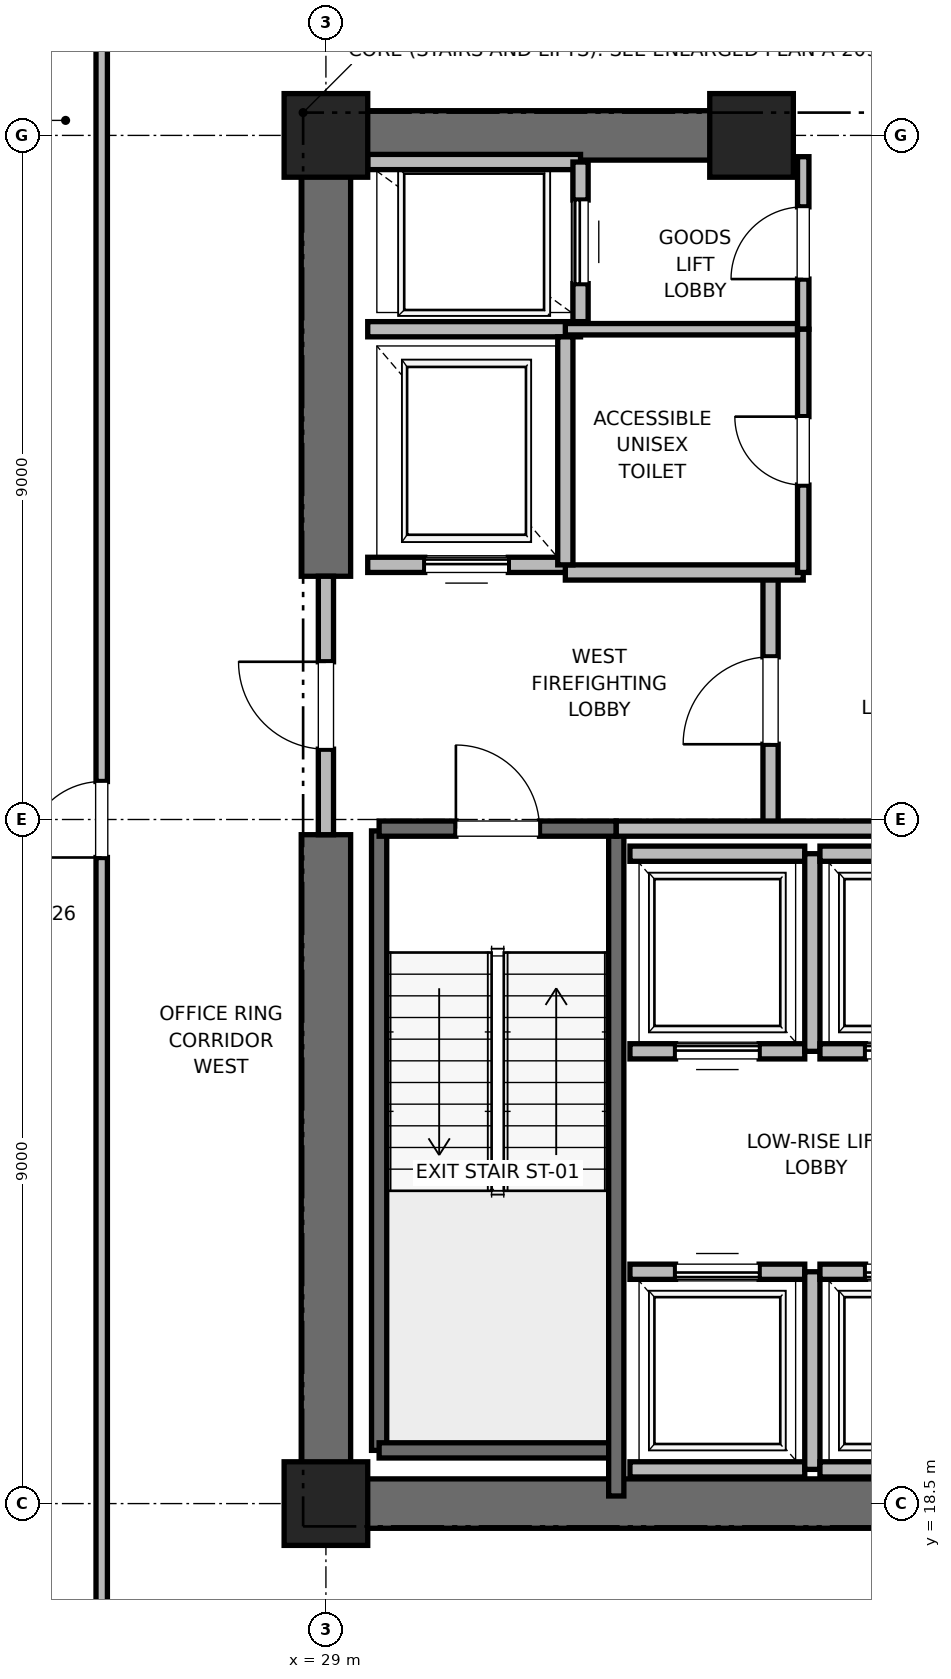
"""IFC4 building model, lengths in metres.
Left out: names, types, materials, properties, quantities, classifications, styles, units other than length and angle.
Written with IfcOpenShell. Run it as: python <this file> out.ifc"""

import sys

from ifc_helpers import new_model, si_unit, direction, frame, frame_2d, origin, origin_2d, place, context, subcontext, project, spatial, rectangle, extrude, element, fill, save


model = new_model("IFC4")
c1 = context("Model", 3, precision=1e-05, world=origin(), true_north=direction((0.0, 1.0)))
c2 = subcontext(c1, "Body", "Model", "MODEL_VIEW")
j1 = project(units=[si_unit("LENGTHUNIT", "METRE"), si_unit("PLANEANGLEUNIT", "RADIAN")], contexts=[c1])
p1 = place(None, origin())
s1 = spatial("IfcSite", under=j1, at=p1, CompositionType="ELEMENT")
p2 = place(p1, origin())
s2 = spatial("IfcBuilding", under=s1, at=p2, CompositionType="ELEMENT")
p3 = place(p2, frame((0.0, 0.0, 31.6)))
s3 = spatial("IfcBuildingStorey", under=s2, at=p3, CompositionType="ELEMENT", Elevation=31.6)
for number, where, z_axis, x_axis in (
    (1, (29.0, 18.5, 0.0), (0.0, 0.0, 1.0), (1.0, 0.0, 0.0)),
    (2, (29.0, 36.5, 0.0), (0.0, 0.0, 1.0), (1.0, 0.0, 0.0)),
    (3, (34.6, 36.5, 0.0), (0.0, 0.0, 1.0), (1.0, 0.0, 0.0)),
):
    element("IfcColumn", number, at=place(p3, frame(where, z_axis=z_axis, x_axis=x_axis)), inside=s3, PredefinedType="PILASTER", context=c2, shape_type="SweptSolid", body=[
        extrude(rectangle(XDim=1.1, YDim=1.1, at=origin_2d()), origin(), (0.0, 0.0, 1.0), 4.0),
    ])
p4 = place(p3, frame((29.0, 18.5, 0.0), z_axis=(0.0, 0.0, 1.0), x_axis=(1.0, 0.0, 0.0)))
e4 = element("IfcWall", 4, at=p4, inside=s3, PredefinedType="SHEAR", context=c2, shape_type="SweptSolid", body=[
    extrude(rectangle(XDim=9.2, YDim=0.65, at=frame_2d((4.6, 0.0))), origin(), (0.0, 0.0, 1.0), 3.76),
])
p5 = place(p3, frame((29.0, 36.5, 0.0), z_axis=(0.0, 0.0, 1.0), x_axis=(1.0, 0.0, 0.0)))
e5 = element("IfcWall", 5, at=p5, inside=s3, PredefinedType="SHEAR", context=c2, shape_type="SweptSolid", body=[
    extrude(rectangle(XDim=5.8, YDim=0.65, at=frame_2d((2.9, 0.0))), origin(), (0.0, 0.0, 1.0), 3.76),
])
p6 = place(p3, frame((29.0, 18.5, 0.0), z_axis=(0.0, 0.0, 1.0), x_axis=(0.0, 1.0, 0.0)))
e6 = element("IfcWall", 6, at=p6, inside=s3, PredefinedType="SHEAR", context=c2, shape_type="SweptSolid", body=[
    extrude(rectangle(XDim=8.8, YDim=0.65, at=frame_2d((4.4, 0.0))), origin(), (0.0, 0.0, 1.0), 3.76),
])
p7 = place(p3, frame((29.0, 30.7, 0.0), z_axis=(0.0, 0.0, 1.0), x_axis=(0.0, 1.0, 0.0)))
e7 = element("IfcWall", 7, at=p7, inside=s3, PredefinedType="SHEAR", context=c2, shape_type="SweptSolid", body=[
    extrude(rectangle(XDim=5.8, YDim=0.65, at=frame_2d((2.9, 0.0))), origin(), (0.0, 0.0, 1.0), 3.76),
])
p8 = place(p3, frame((29.7, 19.2, 0.0), z_axis=(0.0, 0.0, 1.0), x_axis=(0.0, 1.0, 0.0)))
e8 = element("IfcWall", 8, at=p8, inside=s3, PredefinedType="SOLIDWALL", context=c2, shape_type="SweptSolid", body=[
    extrude(rectangle(XDim=8.15, YDim=0.2, at=frame_2d((4.075, 0.0))), origin(), (0.0, 0.0, 1.0), 3.76),
])
p9 = place(p3, frame((29.7, 19.2, 0.0), z_axis=(0.0, 0.0, 1.0), x_axis=(1.0, 0.0, 0.0)))
e9 = element("IfcWall", 9, at=p9, inside=s3, PredefinedType="SOLIDWALL", context=c2, shape_type="SweptSolid", body=[
    extrude(rectangle(XDim=3.12, YDim=0.2, at=frame_2d((1.56, 0.0))), origin(), (0.0, 0.0, 1.0), 3.76),
])
p10 = place(p3, frame((32.82, 18.6, 0.0), z_axis=(0.0, 0.0, 1.0), x_axis=(0.0, 1.0, 0.0)))
e10 = element("IfcWall", 10, at=p10, inside=s3, PredefinedType="SOLIDWALL", context=c2, shape_type="SweptSolid", body=[
    extrude(rectangle(XDim=8.78, YDim=0.2, at=frame_2d((4.39, 0.0))), origin(), (0.0, 0.0, 1.0), 3.76),
])
p11 = place(p3, frame((29.7, 27.38, 0.0), z_axis=(0.0, 0.0, 1.0), x_axis=(1.0, 0.0, 0.0)))
e11 = element("IfcWall", 11, at=p11, inside=s3, PredefinedType="SOLIDWALL", context=c2, shape_type="SweptSolid", body=[
    extrude(rectangle(XDim=3.12, YDim=0.2, at=frame_2d((1.56, 0.0))), origin(), (0.0, 0.0, 1.0), 3.76),
])
p12 = place(p11, frame((1.01, 0.0, 0.0)))
e12 = element("IfcOpeningElement", 12, at=p12, cuts=e11, PredefinedType="OPENING", context=c2, shape_type="SweptSolid", body=[
    extrude(rectangle(XDim=1.1, YDim=2.15, at=frame_2d((0.55, 1.075))), frame((0.0, 0.1, 0.0), z_axis=(0.0, -1.0, 0.0), x_axis=(1.0, 0.0, 0.0)), (0.0, 0.0, 1.0), 0.2),
])
p13 = place(p3, frame((34.85, 27.38, 0.0), z_axis=(0.0, 0.0, 1.0), x_axis=(0.0, 1.0, 0.0)))
e13 = element("IfcWall", 13, at=p13, inside=s3, PredefinedType="PARTITIONING", context=c2, shape_type="SweptSolid", body=[
    extrude(rectangle(XDim=3.37, YDim=0.2, at=frame_2d((1.685, 0.0))), origin(), (0.0, 0.0, 1.0), 3.76),
])
p14 = place(p13, frame((1.11, 0.0, 0.0)))
e14 = element("IfcOpeningElement", 14, at=p14, cuts=e13, PredefinedType="OPENING", context=c2, shape_type="SweptSolid", body=[
    extrude(rectangle(XDim=1.15, YDim=2.2, at=frame_2d((0.575, 1.1))), frame((0.0, 0.1, 0.0), z_axis=(0.0, -1.0, 0.0), x_axis=(1.0, 0.0, 0.0)), (0.0, 0.0, 1.0), 0.2),
])
p15 = place(p3, frame((29.0, 27.3, 0.0), z_axis=(0.0, 0.0, 1.0), x_axis=(0.0, 1.0, 0.0)))
e15 = element("IfcWall", 15, at=p15, inside=s3, PredefinedType="PARTITIONING", context=c2, shape_type="SweptSolid", body=[
    extrude(rectangle(XDim=3.4, YDim=0.2, at=frame_2d((1.7, 0.0))), origin(), (0.0, 0.0, 1.0), 2.54),
])
p16 = place(p15, frame((1.125, 0.0, 0.0)))
e16 = element("IfcOpeningElement", 16, at=p16, cuts=e15, PredefinedType="OPENING", context=c2, shape_type="SweptSolid", body=[
    extrude(rectangle(XDim=1.15, YDim=2.2, at=frame_2d((0.575, 1.1))), frame((0.0, 0.1, 0.0), z_axis=(0.0, -1.0, 0.0), x_axis=(1.0, 0.0, 0.0)), (0.0, 0.0, 1.0), 0.2),
])
p17 = place(p3, frame((32.82, 27.38, 0.0), z_axis=(0.0, 0.0, 1.0), x_axis=(1.0, 0.0, 0.0)))
e17 = element("IfcWall", 17, at=p17, inside=s3, PredefinedType="PARTITIONING", context=c2, shape_type="SweptSolid", body=[
    extrude(rectangle(XDim=5.62, YDim=0.2, at=frame_2d((2.81, 0.0))), origin(), (0.0, 0.0, 1.0), 3.76),
])
p18 = place(p3, frame((32.15, 30.75, 0.0), z_axis=(0.0, 0.0, 1.0), x_axis=(1.0, 0.0, 0.0)))
e18 = element("IfcWall", 18, at=p18, inside=s3, PredefinedType="PARTITIONING", context=c2, shape_type="SweptSolid", body=[
    extrude(rectangle(XDim=3.13, YDim=0.2, at=frame_2d((1.565, 0.0))), origin(), (0.0, 0.0, 1.0), 3.76),
])
p19 = place(p3, frame((29.55, 30.85, 0.0), z_axis=(0.0, 0.0, 1.0), x_axis=(1.0, 0.0, 0.0)))
e19 = element("IfcWall", 19, at=p19, inside=s3, PredefinedType="SOLIDWALL", context=c2, shape_type="SweptSolid", body=[
    extrude(rectangle(XDim=2.6, YDim=0.2, at=frame_2d((1.3, 0.0))), origin(), (0.0, 0.0, 1.0), 2.54),
])
p20 = place(p19, frame((0.75, 0.0, 0.0)))
e20 = element("IfcOpeningElement", 20, at=p20, cuts=e19, PredefinedType="OPENING", context=c2, shape_type="SweptSolid", body=[
    extrude(rectangle(XDim=1.1, YDim=2.2, at=frame_2d((0.55, 1.1))), frame((0.0, 0.1, 0.0), z_axis=(0.0, -1.0, 0.0), x_axis=(1.0, 0.0, 0.0)), (0.0, 0.0, 1.0), 0.2),
])
p21 = place(p3, frame((29.55, 33.95, 0.0), z_axis=(0.0, 0.0, 1.0), x_axis=(1.0, 0.0, 0.0)))
e21 = element("IfcWall", 21, at=p21, inside=s3, PredefinedType="SOLIDWALL", context=c2, shape_type="SweptSolid", body=[
    extrude(rectangle(XDim=2.8, YDim=0.2, at=frame_2d((1.4, 0.0))), origin(), (0.0, 0.0, 1.0), 3.76),
])
p22 = place(p3, frame((32.15, 30.85, 0.0), z_axis=(0.0, 0.0, 1.0), x_axis=(0.0, 1.0, 0.0)))
e22 = element("IfcWall", 22, at=p22, inside=s3, PredefinedType="SOLIDWALL", context=c2, shape_type="SweptSolid", body=[
    extrude(rectangle(XDim=3.0, YDim=0.2, at=frame_2d((1.5, 0.0))), origin(), (0.0, 0.0, 1.0), 3.76),
])
p23 = place(p3, frame((32.35, 36.15, 0.0), z_axis=(0.0, 0.0, 1.0), x_axis=(-1.0, 0.0, 0.0)))
e23 = element("IfcWall", 23, at=p23, inside=s3, PredefinedType="SOLIDWALL", context=c2, shape_type="SweptSolid", body=[
    extrude(rectangle(XDim=2.8, YDim=0.2, at=frame_2d((1.4, 0.0))), origin(), (0.0, 0.0, 1.0), 2.889),
])
p24 = place(p3, frame((32.35, 34.05, 0.0), z_axis=(0.0, 0.0, 1.0), x_axis=(0.0, 1.0, 0.0)))
e24 = element("IfcWall", 24, at=p24, inside=s3, PredefinedType="SOLIDWALL", context=c2, shape_type="SweptSolid", body=[
    extrude(rectangle(XDim=2.1, YDim=0.2, at=frame_2d((1.05, 0.0))), origin(), (0.0, 0.0, 1.0), 3.76),
])
p25 = place(p24, frame((0.5, 0.0, 0.0)))
e25 = element("IfcOpeningElement", 25, at=p25, cuts=e24, PredefinedType="OPENING", context=c2, shape_type="SweptSolid", body=[
    extrude(rectangle(XDim=1.1, YDim=2.2, at=frame_2d((0.55, 1.1))), frame((0.0, 0.1, 0.0), z_axis=(0.0, -1.0, 0.0), x_axis=(1.0, 0.0, 0.0)), (0.0, 0.0, 1.0), 0.2),
])
p26 = place(p3, frame((33.0, 18.95, 0.0), z_axis=(0.0, 0.0, 1.0), x_axis=(1.0, 0.0, 0.0)))
e26 = element("IfcWall", 26, at=p26, inside=s3, PredefinedType="SOLIDWALL", context=c2, shape_type="SweptSolid", body=[
    extrude(rectangle(XDim=2.3, YDim=0.2, at=frame_2d((1.15, 0.0))), origin(), (0.0, 0.0, 1.0), 3.76),
])
p27 = place(p3, frame((35.3, 21.55, 0.0), z_axis=(0.0, 0.0, 1.0), x_axis=(-1.0, 0.0, 0.0)))
e27 = element("IfcWall", 27, at=p27, inside=s3, PredefinedType="SOLIDWALL", context=c2, shape_type="SweptSolid", body=[
    extrude(rectangle(XDim=2.3, YDim=0.2, at=frame_2d((1.15, 0.0))), origin(), (0.0, 0.0, 1.0), 3.76),
])
p28 = place(p27, frame((0.6, 0.0, 0.0)))
e28 = element("IfcOpeningElement", 28, at=p28, cuts=e27, PredefinedType="OPENING", context=c2, shape_type="SweptSolid", body=[
    extrude(rectangle(XDim=1.1, YDim=2.2, at=frame_2d((0.55, 1.1))), frame((0.0, 0.1, 0.0), z_axis=(0.0, -1.0, 0.0), x_axis=(1.0, 0.0, 0.0)), (0.0, 0.0, 1.0), 0.2),
])
p29 = place(p3, frame((35.4, 18.95, 0.0), z_axis=(0.0, 0.0, 1.0), x_axis=(0.0, 1.0, 0.0)))
e29 = element("IfcWall", 29, at=p29, inside=s3, PredefinedType="SOLIDWALL", context=c2, shape_type="SweptSolid", body=[
    extrude(rectangle(XDim=2.6, YDim=0.2, at=frame_2d((1.3, 0.0))), origin(), (0.0, 0.0, 1.0), 3.76),
])
p30 = place(p3, frame((35.5, 18.95, 0.0), z_axis=(0.0, 0.0, 1.0), x_axis=(1.0, 0.0, 0.0)))
e30 = element("IfcWall", 30, at=p30, inside=s3, PredefinedType="SOLIDWALL", context=c2, shape_type="SweptSolid", body=[
    extrude(rectangle(XDim=2.3, YDim=0.2, at=frame_2d((1.15, 0.0))), origin(), (0.0, 0.0, 1.0), 2.54),
])
p31 = place(p3, frame((37.8, 21.55, 0.0), z_axis=(0.0, 0.0, 1.0), x_axis=(-1.0, 0.0, 0.0)))
e31 = element("IfcWall", 31, at=p31, inside=s3, PredefinedType="SOLIDWALL", context=c2, shape_type="SweptSolid", body=[
    extrude(rectangle(XDim=2.3, YDim=0.2, at=frame_2d((1.15, 0.0))), origin(), (0.0, 0.0, 1.0), 3.76),
])
p32 = place(p31, frame((0.6, 0.0, 0.0)))
e32 = element("IfcOpeningElement", 32, at=p32, cuts=e31, PredefinedType="OPENING", context=c2, shape_type="SweptSolid", body=[
    extrude(rectangle(XDim=1.1, YDim=2.2, at=frame_2d((0.55, 1.1))), frame((0.0, 0.1, 0.0), z_axis=(0.0, -1.0, 0.0), x_axis=(1.0, 0.0, 0.0)), (0.0, 0.0, 1.0), 0.2),
])
p33 = place(p3, frame((33.0, 24.45, 0.0), z_axis=(0.0, 0.0, 1.0), x_axis=(1.0, 0.0, 0.0)))
e33 = element("IfcWall", 33, at=p33, inside=s3, PredefinedType="SOLIDWALL", context=c2, shape_type="SweptSolid", body=[
    extrude(rectangle(XDim=2.3, YDim=0.2, at=frame_2d((1.15, 0.0))), origin(), (0.0, 0.0, 1.0), 3.76),
])
p34 = place(p33, frame((0.6, 0.0, 0.0)))
e34 = element("IfcOpeningElement", 34, at=p34, cuts=e33, PredefinedType="OPENING", context=c2, shape_type="SweptSolid", body=[
    extrude(rectangle(XDim=1.1, YDim=2.2, at=frame_2d((0.55, 1.1))), frame((0.0, 0.1, 0.0), z_axis=(0.0, -1.0, 0.0), x_axis=(1.0, 0.0, 0.0)), (0.0, 0.0, 1.0), 0.2),
])
p35 = place(p3, frame((35.3, 27.05, 0.0), z_axis=(0.0, 0.0, 1.0), x_axis=(-1.0, 0.0, 0.0)))
e35 = element("IfcWall", 35, at=p35, inside=s3, PredefinedType="SOLIDWALL", context=c2, shape_type="SweptSolid", body=[
    extrude(rectangle(XDim=2.3, YDim=0.2, at=frame_2d((1.15, 0.0))), origin(), (0.0, 0.0, 1.0), 3.76),
])
p36 = place(p3, frame((35.4, 24.45, 0.0), z_axis=(0.0, 0.0, 1.0), x_axis=(0.0, 1.0, 0.0)))
e36 = element("IfcWall", 36, at=p36, inside=s3, PredefinedType="SOLIDWALL", context=c2, shape_type="SweptSolid", body=[
    extrude(rectangle(XDim=2.6, YDim=0.2, at=frame_2d((1.3, 0.0))), origin(), (0.0, 0.0, 1.0), 3.76),
])
p37 = place(p3, frame((35.5, 24.45, 0.0), z_axis=(0.0, 0.0, 1.0), x_axis=(1.0, 0.0, 0.0)))
e37 = element("IfcWall", 37, at=p37, inside=s3, PredefinedType="SOLIDWALL", context=c2, shape_type="SweptSolid", body=[
    extrude(rectangle(XDim=2.3, YDim=0.2, at=frame_2d((1.15, 0.0))), origin(), (0.0, 0.0, 1.0), 3.76),
])
p38 = place(p37, frame((0.6, 0.0, 0.0)))
e38 = element("IfcOpeningElement", 38, at=p38, cuts=e37, PredefinedType="OPENING", context=c2, shape_type="SweptSolid", body=[
    extrude(rectangle(XDim=1.1, YDim=2.2, at=frame_2d((0.55, 1.1))), frame((0.0, 0.1, 0.0), z_axis=(0.0, -1.0, 0.0), x_axis=(1.0, 0.0, 0.0)), (0.0, 0.0, 1.0), 0.2),
])
p39 = place(p3, frame((37.8, 27.05, 0.0), z_axis=(0.0, 0.0, 1.0), x_axis=(-1.0, 0.0, 0.0)))
e39 = element("IfcWall", 39, at=p39, inside=s3, PredefinedType="SOLIDWALL", context=c2, shape_type="SweptSolid", body=[
    extrude(rectangle(XDim=2.3, YDim=0.2, at=frame_2d((1.15, 0.0))), origin(), (0.0, 0.0, 1.0), 3.76),
])
p40 = place(p3, frame((32.15, 33.95, 0.0), z_axis=(0.0, 0.0, 1.0), x_axis=(1.0, 0.0, 0.0)))
e40 = element("IfcWall", 40, at=p40, inside=s3, PredefinedType="PARTITIONING", context=c2, shape_type="SweptSolid", body=[
    extrude(rectangle(XDim=3.13, YDim=0.15, at=frame_2d((1.565, 0.0))), origin(), (0.0, 0.0, 1.0), 2.85),
])
p41 = place(p3, frame((35.28, 33.95, 0.0), z_axis=(0.0, 0.0, 1.0), x_axis=(0.0, 1.0, 0.0)))
e41 = element("IfcWall", 41, at=p41, inside=s3, PredefinedType="PARTITIONING", context=c2, shape_type="SweptSolid", body=[
    extrude(rectangle(XDim=2.27, YDim=0.15, at=frame_2d((1.135, 0.0))), origin(), (0.0, 0.0, 1.0), 2.54),
])
p42 = place(p41, frame((0.66, 0.0, 0.0)))
e42 = element("IfcOpeningElement", 42, at=p42, cuts=e41, PredefinedType="OPENING", context=c2, shape_type="SweptSolid", body=[
    extrude(rectangle(XDim=0.95, YDim=2.15, at=frame_2d((0.475, 1.075))), frame((0.0, 0.075, 0.0), z_axis=(0.0, -1.0, 0.0), x_axis=(1.0, 0.0, 0.0)), (0.0, 0.0, 1.0), 0.15),
])
p43 = place(p3, frame((35.28, 30.75, 0.0), z_axis=(0.0, 0.0, 1.0), x_axis=(0.0, 1.0, 0.0)))
e43 = element("IfcWall", 43, at=p43, inside=s3, PredefinedType="PARTITIONING", context=c2, shape_type="SweptSolid", body=[
    extrude(rectangle(XDim=3.2, YDim=0.15, at=frame_2d((1.6, 0.0))), origin(), (0.0, 0.0, 1.0), 2.85),
])
p44 = place(p43, frame((1.15, 0.0, 0.0)))
e44 = element("IfcOpeningElement", 44, at=p44, cuts=e43, PredefinedType="OPENING", context=c2, shape_type="SweptSolid", body=[
    extrude(rectangle(XDim=0.9, YDim=2.1, at=frame_2d((0.45, 1.05))), frame((0.0, 0.075, 0.0), z_axis=(0.0, -1.0, 0.0), x_axis=(1.0, 0.0, 0.0)), (0.0, 0.0, 1.0), 0.15),
])
p45 = place(p3, frame((26.05, 9.605, 0.0), z_axis=(0.0, 0.0, 1.0), x_axis=(0.0, 1.0, 0.0)))
e45 = element("IfcWall", 45, at=p45, inside=s3, PredefinedType="PARTITIONING", context=c2, shape_type="SweptSolid", body=[
    extrude(rectangle(XDim=35.79, YDim=0.15, at=frame_2d((17.895, 0.0))), origin(), (0.0, 0.0, 1.0), 2.85),
])
p46 = place(p45, frame((17.395, 0.0, 0.0)))
e46 = element("IfcOpeningElement", 46, at=p46, cuts=e45, PredefinedType="OPENING", context=c2, shape_type="SweptSolid", body=[
    extrude(rectangle(XDim=1.0, YDim=2.15, at=frame_2d((0.5, 1.075))), frame((0.0, 0.075, 0.0), z_axis=(0.0, -1.0, 0.0), x_axis=(1.0, 0.0, 0.0)), (0.0, 0.0, 1.0), 0.15),
])
p47 = place(p12, origin())
e47 = element("IfcDoor", 47, at=p47, inside=s3, OperationType="SINGLE_SWING_LEFT", PredefinedType="DOOR", context=c2, shape_type="SweptSolid", body=[
    extrude(rectangle(XDim=1.1, YDim=2.15, at=frame_2d((0.55, 1.075))), frame((0.0, 0.025, 0.0), z_axis=(0.0, -1.0, 0.0), x_axis=(1.0, 0.0, 0.0)), (0.0, 0.0, 1.0), 0.05),
])
fill(e12, e47)
p48 = place(p14, origin())
e48 = element("IfcDoor", 48, at=p48, inside=s3, OperationType="SINGLE_SWING_LEFT", PredefinedType="DOOR", context=c2, shape_type="SweptSolid", body=[
    extrude(rectangle(XDim=1.15, YDim=2.2, at=frame_2d((0.575, 1.1))), frame((0.0, 0.025, 0.0), z_axis=(0.0, -1.0, 0.0), x_axis=(1.0, 0.0, 0.0)), (0.0, 0.0, 1.0), 0.05),
])
fill(e14, e48)
p49 = place(p16, origin())
e49 = element("IfcDoor", 49, at=p49, inside=s3, OperationType="SINGLE_SWING_RIGHT", PredefinedType="DOOR", context=c2, shape_type="SweptSolid", body=[
    extrude(rectangle(XDim=1.15, YDim=2.2, at=frame_2d((0.575, 1.1))), frame((0.0, 0.025, 0.0), z_axis=(0.0, -1.0, 0.0), x_axis=(1.0, 0.0, 0.0)), (0.0, 0.0, 1.0), 0.05),
])
fill(e16, e49)
p50 = place(p20, origin())
e50 = element("IfcDoor", 50, at=p50, inside=s3, OperationType="SLIDING_TO_RIGHT", PredefinedType="DOOR", context=c2, shape_type="SweptSolid", body=[
    extrude(rectangle(XDim=1.1, YDim=2.2, at=frame_2d((0.55, 1.1))), frame((0.0, 0.025, 0.0), z_axis=(0.0, -1.0, 0.0), x_axis=(1.0, 0.0, 0.0)), (0.0, 0.0, 1.0), 0.05),
])
fill(e20, e50)
p51 = place(p25, origin())
e51 = element("IfcDoor", 51, at=p51, inside=s3, OperationType="SLIDING_TO_RIGHT", PredefinedType="DOOR", context=c2, shape_type="SweptSolid", body=[
    extrude(rectangle(XDim=1.1, YDim=2.2, at=frame_2d((0.55, 1.1))), frame((0.0, 0.025, 0.0), z_axis=(0.0, -1.0, 0.0), x_axis=(1.0, 0.0, 0.0)), (0.0, 0.0, 1.0), 0.05),
])
fill(e25, e51)
p52 = place(p28, origin())
e52 = element("IfcDoor", 52, at=p52, inside=s3, OperationType="SLIDING_TO_RIGHT", PredefinedType="DOOR", context=c2, shape_type="SweptSolid", body=[
    extrude(rectangle(XDim=1.1, YDim=2.2, at=frame_2d((0.55, 1.1))), frame((0.0, 0.025, 0.0), z_axis=(0.0, -1.0, 0.0), x_axis=(1.0, 0.0, 0.0)), (0.0, 0.0, 1.0), 0.05),
])
fill(e28, e52)
p53 = place(p32, origin())
e53 = element("IfcDoor", 53, at=p53, inside=s3, OperationType="SLIDING_TO_RIGHT", PredefinedType="DOOR", context=c2, shape_type="SweptSolid", body=[
    extrude(rectangle(XDim=1.1, YDim=2.2, at=frame_2d((0.55, 1.1))), frame((0.0, 0.025, 0.0), z_axis=(0.0, -1.0, 0.0), x_axis=(1.0, 0.0, 0.0)), (0.0, 0.0, 1.0), 0.05),
])
fill(e32, e53)
p54 = place(p34, origin())
e54 = element("IfcDoor", 54, at=p54, inside=s3, OperationType="SLIDING_TO_RIGHT", PredefinedType="DOOR", context=c2, shape_type="SweptSolid", body=[
    extrude(rectangle(XDim=1.1, YDim=2.2, at=frame_2d((0.55, 1.1))), frame((0.0, 0.025, 0.0), z_axis=(0.0, -1.0, 0.0), x_axis=(1.0, 0.0, 0.0)), (0.0, 0.0, 1.0), 0.05),
])
fill(e34, e54)
p55 = place(p38, origin())
e55 = element("IfcDoor", 55, at=p55, inside=s3, OperationType="SLIDING_TO_RIGHT", PredefinedType="DOOR", context=c2, shape_type="SweptSolid", body=[
    extrude(rectangle(XDim=1.1, YDim=2.2, at=frame_2d((0.55, 1.1))), frame((0.0, 0.025, 0.0), z_axis=(0.0, -1.0, 0.0), x_axis=(1.0, 0.0, 0.0)), (0.0, 0.0, 1.0), 0.05),
])
fill(e38, e55)
p56 = place(p42, origin())
e56 = element("IfcDoor", 56, at=p56, inside=s3, OperationType="SINGLE_SWING_LEFT", PredefinedType="DOOR", context=c2, shape_type="SweptSolid", body=[
    extrude(rectangle(XDim=0.95, YDim=2.15, at=frame_2d((0.475, 1.075))), frame((0.0, 0.025, 0.0), z_axis=(0.0, -1.0, 0.0), x_axis=(1.0, 0.0, 0.0)), (0.0, 0.0, 1.0), 0.05),
])
fill(e42, e56)
p57 = place(p44, origin())
e57 = element("IfcDoor", 57, at=p57, inside=s3, OperationType="SINGLE_SWING_RIGHT", PredefinedType="DOOR", context=c2, shape_type="SweptSolid", body=[
    extrude(rectangle(XDim=0.9, YDim=2.1, at=frame_2d((0.45, 1.05))), frame((0.0, 0.025, 0.0), z_axis=(0.0, -1.0, 0.0), x_axis=(1.0, 0.0, 0.0)), (0.0, 0.0, 1.0), 0.05),
])
fill(e44, e57)
p58 = place(p46, origin())
e58 = element("IfcDoor", 58, at=p58, inside=s3, OperationType="SINGLE_SWING_LEFT", PredefinedType="DOOR", context=c2, shape_type="SweptSolid", body=[
    extrude(rectangle(XDim=1.0, YDim=2.15, at=frame_2d((0.5, 1.075))), frame((0.0, 0.025, 0.0), z_axis=(0.0, -1.0, 0.0), x_axis=(1.0, 0.0, 0.0)), (0.0, 0.0, 1.0), 0.05),
])
fill(e46, e58)
save(model, sys.argv[1])
